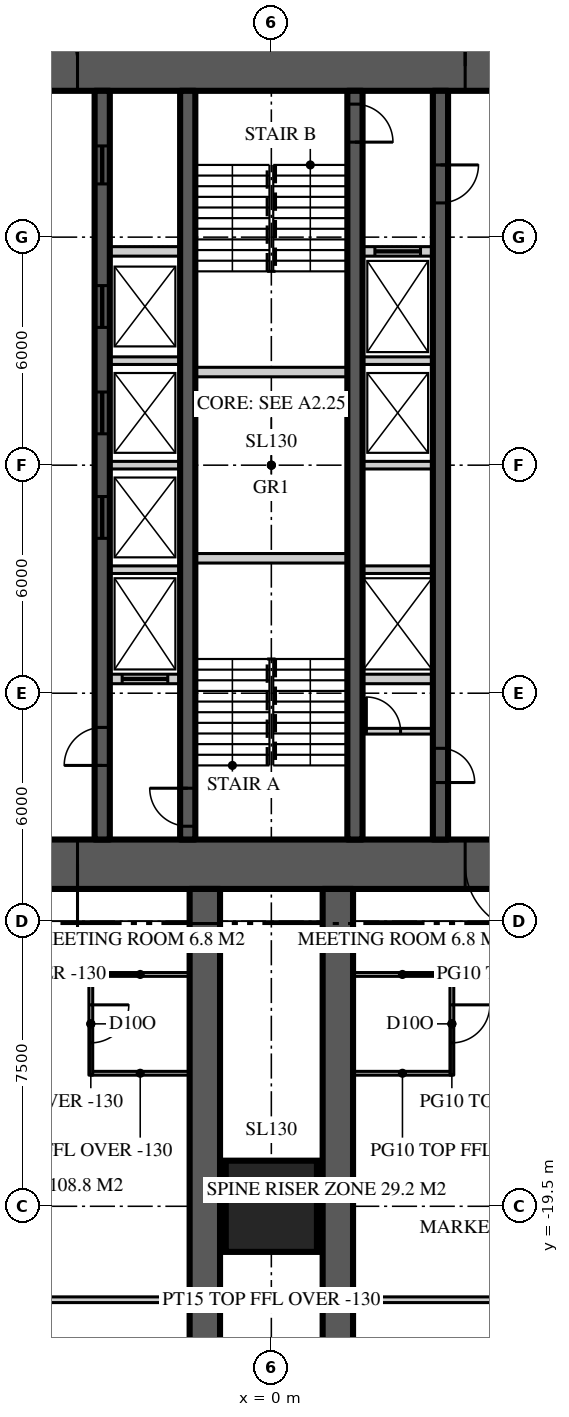
"""IFC4 building model, lengths in metres.
Left out: names, types, materials, properties, quantities, classifications, styles, units other than length and angle.
Written with IfcOpenShell. Run it as: python <this file> out.ifc"""

import sys

from ifc_helpers import new_model, si_unit, direction, frame, frame_2d, origin, origin_2d, place, context, subcontext, project, spatial, rectangle, extrude, element, fill, save


model = new_model("IFC4")
c1 = context("Model", 3, precision=1e-05, world=origin(), true_north=direction((0.0, 1.0)))
c2 = subcontext(c1, "Body", "Model", "MODEL_VIEW")
j1 = project(units=[si_unit("LENGTHUNIT", "METRE"), si_unit("PLANEANGLEUNIT", "RADIAN")], contexts=[c1])
p1 = place(None, origin())
s1 = spatial("IfcSite", under=j1, at=p1, CompositionType="ELEMENT")
p2 = place(p1, origin())
s2 = spatial("IfcBuilding", under=s1, at=p2, CompositionType="ELEMENT")
p3 = place(p2, frame((0.0, 0.0, 190.5)))
s3 = spatial("IfcBuildingStorey", under=s2, at=p3, CompositionType="ELEMENT", Elevation=190.5)
p4 = place(p3, frame((-11.15, 10.5, 0.0), z_axis=(0.0, 0.0, 1.0), x_axis=(1.0, 0.0, 0.0)))
e1 = element("IfcWall", 1, at=p4, inside=s3, PredefinedType="SHEAR", context=c2, shape_type="SweptSolid", body=[
    extrude(rectangle(XDim=22.3, YDim=1.3, at=frame_2d((11.15, 0.0))), origin(), (0.0, 0.0, 1.0), 3.9),
])
p5 = place(p4, frame((4.25, 0.0, 0.0)))
e2 = element("IfcOpeningElement", 2, at=p5, cuts=e1, PredefinedType="OPENING", context=c2, shape_type="SweptSolid", body=[
    extrude(rectangle(XDim=1.8, YDim=2.2, at=frame_2d((0.9, 1.1))), frame((0.0, 0.66, 0.0), z_axis=(0.0, -1.0, 0.0), x_axis=(1.0, 0.0, 0.0)), (0.0, 0.0, 1.0), 1.32),
])
p6 = place(p4, frame((16.25, 0.0, 0.0)))
e3 = element("IfcOpeningElement", 3, at=p6, cuts=e1, PredefinedType="OPENING", context=c2, shape_type="SweptSolid", body=[
    extrude(rectangle(XDim=1.8, YDim=2.2, at=frame_2d((0.9, 1.1))), frame((0.0, 0.66, 0.0), z_axis=(0.0, -1.0, 0.0), x_axis=(1.0, 0.0, 0.0)), (0.0, 0.0, 1.0), 1.32),
])
p7 = place(p3, frame((11.15, -10.5, 0.0), z_axis=(0.0, 0.0, 1.0), x_axis=(-1.0, 0.0, 0.0)))
e4 = element("IfcWall", 4, at=p7, inside=s3, PredefinedType="SHEAR", context=c2, shape_type="SweptSolid", body=[
    extrude(rectangle(XDim=22.3, YDim=1.3, at=frame_2d((11.15, 0.0))), origin(), (0.0, 0.0, 1.0), 3.9),
])
p8 = place(p7, frame((16.25, 0.0, 0.0)))
e5 = element("IfcOpeningElement", 5, at=p8, cuts=e4, PredefinedType="OPENING", context=c2, shape_type="SweptSolid", body=[
    extrude(rectangle(XDim=1.8, YDim=2.2, at=frame_2d((0.9, 1.1))), frame((0.0, 0.66, 0.0), z_axis=(0.0, -1.0, 0.0), x_axis=(1.0, 0.0, 0.0)), (0.0, 0.0, 1.0), 1.32),
])
p9 = place(p7, frame((4.25, 0.0, 0.0)))
e6 = element("IfcOpeningElement", 6, at=p9, cuts=e4, PredefinedType="OPENING", context=c2, shape_type="SweptSolid", body=[
    extrude(rectangle(XDim=1.8, YDim=2.2, at=frame_2d((0.9, 1.1))), frame((0.0, 0.66, 0.0), z_axis=(0.0, -1.0, 0.0), x_axis=(1.0, 0.0, 0.0)), (0.0, 0.0, 1.0), 1.32),
])
for number, where, z_axis, x_axis in (
    (7, (-1.75, -11.15, 0.0), (0.0, 0.0, 1.0), (0.0, -1.0, 0.0)),
    (8, (1.75, -11.15, 0.0), (0.0, 0.0, 1.0), (0.0, -1.0, 0.0)),
):
    element("IfcWall", number, at=place(p3, frame(where, z_axis=z_axis, x_axis=x_axis)), inside=s3, PredefinedType="SHEAR", context=c2, shape_type="SweptSolid", body=[
        extrude(rectangle(XDim=15.25, YDim=0.8, at=frame_2d((7.625, 0.0))), origin(), (0.0, 0.0, 1.0), 3.9),
    ])
p10 = place(p3, frame((0.0, -19.5, 0.0), z_axis=(0.0, 0.0, 1.0), x_axis=(1.0, 0.0, 0.0)))
e9 = element("IfcColumn", 9, at=p10, inside=s3, PredefinedType="COLUMN", context=c2, shape_type="SweptSolid", body=[
    extrude(rectangle(XDim=2.4, YDim=2.4, at=origin_2d()), origin(), (0.0, 0.0, 1.0), 3.9),
])
p11 = place(p3, frame((-4.45, -9.85, 0.0), z_axis=(0.0, 0.0, 1.0), x_axis=(0.0, 1.0, 0.0)))
e10 = element("IfcWall", 10, at=p11, inside=s3, PredefinedType="SHEAR", context=c2, shape_type="SweptSolid", body=[
    extrude(rectangle(XDim=19.7, YDim=0.4, at=frame_2d((9.85, 0.0))), origin(), (0.0, 0.0, 1.0), 3.9),
])
p12 = place(p11, frame((1.95, 0.0, 0.0)))
e11 = element("IfcOpeningElement", 11, at=p12, cuts=e10, PredefinedType="OPENING", context=c2, shape_type="SweptSolid", body=[
    extrude(rectangle(XDim=1.0, YDim=2.2, at=frame_2d((0.5, 1.1))), frame((0.0, 0.21, 0.0), z_axis=(0.0, -1.0, 0.0), x_axis=(1.0, 0.0, 0.0)), (0.0, 0.0, 1.0), 0.42),
])
p13 = place(p11, frame((17.25, 0.0, 0.0)))
e12 = element("IfcOpeningElement", 12, at=p13, cuts=e10, PredefinedType="OPENING", context=c2, shape_type="SweptSolid", body=[
    extrude(rectangle(XDim=1.0, YDim=2.1, at=frame_2d((0.5, 1.05))), frame((0.0, 0.21, 0.0), z_axis=(0.0, -1.0, 0.0), x_axis=(1.0, 0.0, 0.0)), (0.0, 0.0, 1.0), 0.42),
])
p14 = place(p11, frame((7.925, 0.0, 0.0)))
e13 = element("IfcOpeningElement", 13, at=p14, cuts=e10, PredefinedType="OPENING", context=c2, shape_type="SweptSolid", body=[
    extrude(rectangle(XDim=1.1, YDim=2.2, at=frame_2d((0.55, 1.1))), frame((0.0, 0.21, 0.0), z_axis=(0.0, -1.0, 0.0), x_axis=(1.0, 0.0, 0.0)), (0.0, 0.0, 1.0), 0.42),
])
p15 = place(p11, frame((10.675, 0.0, 0.0)))
e14 = element("IfcOpeningElement", 14, at=p15, cuts=e10, PredefinedType="OPENING", context=c2, shape_type="SweptSolid", body=[
    extrude(rectangle(XDim=1.1, YDim=2.2, at=frame_2d((0.55, 1.1))), frame((0.0, 0.21, 0.0), z_axis=(0.0, -1.0, 0.0), x_axis=(1.0, 0.0, 0.0)), (0.0, 0.0, 1.0), 0.42),
])
p16 = place(p11, frame((13.475, 0.0, 0.0)))
e15 = element("IfcOpeningElement", 15, at=p16, cuts=e10, PredefinedType="OPENING", context=c2, shape_type="SweptSolid", body=[
    extrude(rectangle(XDim=1.1, YDim=2.2, at=frame_2d((0.55, 1.1))), frame((0.0, 0.21, 0.0), z_axis=(0.0, -1.0, 0.0), x_axis=(1.0, 0.0, 0.0)), (0.0, 0.0, 1.0), 0.42),
])
p17 = place(p3, frame((4.45, 9.85, 0.0), z_axis=(0.0, 0.0, 1.0), x_axis=(0.0, -1.0, 0.0)))
e16 = element("IfcWall", 16, at=p17, inside=s3, PredefinedType="SHEAR", context=c2, shape_type="SweptSolid", body=[
    extrude(rectangle(XDim=19.7, YDim=0.4, at=frame_2d((9.85, 0.0))), origin(), (0.0, 0.0, 1.0), 3.9),
])
p18 = place(p17, frame((1.95, 0.0, 0.0)))
e17 = element("IfcOpeningElement", 17, at=p18, cuts=e16, PredefinedType="OPENING", context=c2, shape_type="SweptSolid", body=[
    extrude(rectangle(XDim=1.0, YDim=2.2, at=frame_2d((0.5, 1.1))), frame((0.0, 0.21, 0.0), z_axis=(0.0, -1.0, 0.0), x_axis=(1.0, 0.0, 0.0)), (0.0, 0.0, 1.0), 0.42),
])
p19 = place(p17, frame((17.3, 0.0, 0.0)))
e18 = element("IfcOpeningElement", 18, at=p19, cuts=e16, PredefinedType="OPENING", context=c2, shape_type="SweptSolid", body=[
    extrude(rectangle(XDim=0.9, YDim=2.1, at=frame_2d((0.45, 1.05))), frame((0.0, 0.21, 0.0), z_axis=(0.0, -1.0, 0.0), x_axis=(1.0, 0.0, 0.0)), (0.0, 0.0, 1.0), 0.42),
])
p20 = place(p3, frame((-2.2, -9.85, 0.0), z_axis=(0.0, 0.0, 1.0), x_axis=(0.0, 1.0, 0.0)))
e19 = element("IfcWall", 19, at=p20, inside=s3, PredefinedType="SHEAR", context=c2, shape_type="SweptSolid", body=[
    extrude(rectangle(XDim=19.7, YDim=0.4, at=frame_2d((9.85, 0.0))), origin(), (0.0, 0.0, 1.0), 3.9),
])
p21 = place(p20, frame((0.35, 0.0, 0.0)))
e20 = element("IfcOpeningElement", 20, at=p21, cuts=e19, PredefinedType="OPENING", context=c2, shape_type="SweptSolid", body=[
    extrude(rectangle(XDim=1.0, YDim=2.2, at=frame_2d((0.5, 1.1))), frame((0.0, 0.21, 0.0), z_axis=(0.0, -1.0, 0.0), x_axis=(1.0, 0.0, 0.0)), (0.0, 0.0, 1.0), 0.42),
])
p22 = place(p3, frame((2.2, 9.85, 0.0), z_axis=(0.0, 0.0, 1.0), x_axis=(0.0, -1.0, 0.0)))
e21 = element("IfcWall", 21, at=p22, inside=s3, PredefinedType="SHEAR", context=c2, shape_type="SweptSolid", body=[
    extrude(rectangle(XDim=19.7, YDim=0.4, at=frame_2d((9.85, 0.0))), origin(), (0.0, 0.0, 1.0), 3.9),
])
p23 = place(p22, frame((0.35, 0.0, 0.0)))
e22 = element("IfcOpeningElement", 22, at=p23, cuts=e21, PredefinedType="OPENING", context=c2, shape_type="SweptSolid", body=[
    extrude(rectangle(XDim=1.0, YDim=2.2, at=frame_2d((0.5, 1.1))), frame((0.0, 0.21, 0.0), z_axis=(0.0, -1.0, 0.0), x_axis=(1.0, 0.0, 0.0)), (0.0, 0.0, 1.0), 0.42),
])
p24 = place(p3, frame((-4.25, 5.625, 0.0), z_axis=(0.0, 0.0, 1.0), x_axis=(1.0, 0.0, 0.0)))
e23 = element("IfcWall", 23, at=p24, inside=s3, PredefinedType="SOLIDWALL", context=c2, shape_type="SweptSolid", body=[
    extrude(rectangle(XDim=1.85, YDim=0.25, at=frame_2d((0.925, 0.0))), origin(), (0.0, 0.0, 1.0), 3.7),
])
p25 = place(p3, frame((2.4, 5.625, 0.0), z_axis=(0.0, 0.0, 1.0), x_axis=(1.0, 0.0, 0.0)))
e24 = element("IfcWall", 24, at=p25, inside=s3, PredefinedType="SOLIDWALL", context=c2, shape_type="SweptSolid", body=[
    extrude(rectangle(XDim=1.85, YDim=0.25, at=frame_2d((0.925, 0.0))), origin(), (0.0, 0.0, 1.0), 3.7),
])
p26 = place(p25, frame((0.325, 0.0, 0.0)))
e25 = element("IfcOpeningElement", 25, at=p26, cuts=e24, PredefinedType="OPENING", context=c2, shape_type="SweptSolid", body=[
    extrude(rectangle(XDim=1.2, YDim=2.2, at=frame_2d((0.6, 1.1))), frame((0.0, 0.135, 0.0), z_axis=(0.0, -1.0, 0.0), x_axis=(1.0, 0.0, 0.0)), (0.0, 0.0, 1.0), 0.27),
])
p27 = place(p3, frame((-4.25, -5.625, 0.0), z_axis=(0.0, 0.0, 1.0), x_axis=(1.0, 0.0, 0.0)))
e26 = element("IfcWall", 26, at=p27, inside=s3, PredefinedType="SOLIDWALL", context=c2, shape_type="SweptSolid", body=[
    extrude(rectangle(XDim=1.85, YDim=0.25, at=frame_2d((0.925, 0.0))), origin(), (0.0, 0.0, 1.0), 3.7),
])
p28 = place(p27, frame((0.325, 0.0, 0.0)))
e27 = element("IfcOpeningElement", 27, at=p28, cuts=e26, PredefinedType="OPENING", context=c2, shape_type="SweptSolid", body=[
    extrude(rectangle(XDim=1.2, YDim=2.2, at=frame_2d((0.6, 1.1))), frame((0.0, 0.135, 0.0), z_axis=(0.0, -1.0, 0.0), x_axis=(1.0, 0.0, 0.0)), (0.0, 0.0, 1.0), 0.27),
])
p29 = place(p3, frame((2.4, -5.625, 0.0), z_axis=(0.0, 0.0, 1.0), x_axis=(1.0, 0.0, 0.0)))
e28 = element("IfcWall", 28, at=p29, inside=s3, PredefinedType="SOLIDWALL", context=c2, shape_type="SweptSolid", body=[
    extrude(rectangle(XDim=1.85, YDim=0.25, at=frame_2d((0.925, 0.0))), origin(), (0.0, 0.0, 1.0), 3.7),
])
for number, where, z_axis, x_axis in (
    (29, (-2.0, -2.45, 0.0), (0.0, 0.0, 1.0), (1.0, 0.0, 0.0)),
    (30, (-2.0, 2.45, 0.0), (0.0, 0.0, 1.0), (1.0, 0.0, 0.0)),
):
    element("IfcWall", number, at=place(p3, frame(where, z_axis=z_axis, x_axis=x_axis)), inside=s3, PredefinedType="SOLIDWALL", context=c2, shape_type="SweptSolid", body=[
        extrude(rectangle(XDim=4.0, YDim=0.25, at=frame_2d((2.0, 0.0))), origin(), (0.0, 0.0, 1.0), 3.7),
    ])
for number, where, z_axis, x_axis in (
    (31, (-4.25, -2.75, 0.0), (0.0, 0.0, 1.0), (1.0, 0.0, 0.0)),
    (32, (2.4, -2.75, 0.0), (0.0, 0.0, 1.0), (1.0, 0.0, 0.0)),
    (33, (-4.25, 0.0, 0.0), (0.0, 0.0, 1.0), (1.0, 0.0, 0.0)),
    (34, (2.4, 0.0, 0.0), (0.0, 0.0, 1.0), (1.0, 0.0, 0.0)),
    (35, (-4.25, 2.75, 0.0), (0.0, 0.0, 1.0), (1.0, 0.0, 0.0)),
    (36, (2.4, 2.75, 0.0), (0.0, 0.0, 1.0), (1.0, 0.0, 0.0)),
):
    element("IfcWall", number, at=place(p3, frame(where, z_axis=z_axis, x_axis=x_axis)), inside=s3, PredefinedType="SOLIDWALL", context=c2, shape_type="SweptSolid", body=[
        extrude(rectangle(XDim=1.85, YDim=0.2, at=frame_2d((0.925, 0.0))), origin(), (0.0, 0.0, 1.0), 3.7),
    ])
p30 = place(p3, frame((-12.786, -21.959, 0.0), z_axis=(0.0, 0.0, 1.0), x_axis=(1.0, 0.0, 0.0)))
e37 = element("IfcWall", 37, at=p30, inside=s3, PredefinedType="PARTITIONING", context=c2, shape_type="SweptSolid", body=[
    extrude(rectangle(XDim=25.573, YDim=0.15, at=frame_2d((12.786, 0.0))), origin(), (0.0, 0.0, 1.0), 3.77),
])
p31 = place(p30, frame((18.687, 0.0, 0.0)))
e38 = element("IfcOpeningElement", 38, at=p31, cuts=e37, PredefinedType="OPENING", context=c2, shape_type="SweptSolid", body=[
    extrude(rectangle(XDim=1.0, YDim=2.2, at=frame_2d((0.5, 1.1))), frame((0.0, 0.085, 0.0), z_axis=(0.0, -1.0, 0.0), x_axis=(1.0, 0.0, 0.0)), (0.0, 0.0, 1.0), 0.17),
])
p32 = place(p30, frame((5.886, 0.0, 0.0)))
e39 = element("IfcOpeningElement", 39, at=p32, cuts=e37, PredefinedType="OPENING", context=c2, shape_type="SweptSolid", body=[
    extrude(rectangle(XDim=1.0, YDim=2.2, at=frame_2d((0.5, 1.1))), frame((0.0, 0.085, 0.0), z_axis=(0.0, -1.0, 0.0), x_axis=(1.0, 0.0, 0.0)), (0.0, 0.0, 1.0), 0.17),
])
for number, where, z_axis, x_axis in (
    (40, (2.15, -13.4, 0.0), (0.0, 0.0, 1.0), (1.0, 0.0, 0.0)),
    (41, (2.15, -16.0, 0.0), (0.0, 0.0, 1.0), (1.0, 0.0, 0.0)),
):
    element("IfcWall", number, at=place(p3, frame(where, z_axis=z_axis, x_axis=x_axis)), inside=s3, PredefinedType="PARTITIONING", context=c2, shape_type="SweptSolid", body=[
        extrude(rectangle(XDim=2.6, YDim=0.1, at=frame_2d((1.3, 0.0))), origin(), (0.0, 0.0, 1.0), 3.77),
    ])
p33 = place(p3, frame((4.75, -13.35, 0.0), z_axis=(0.0, 0.0, 1.0), x_axis=(0.0, -1.0, 0.0)))
e42 = element("IfcWall", 42, at=p33, inside=s3, PredefinedType="PARTITIONING", context=c2, shape_type="SweptSolid", body=[
    extrude(rectangle(XDim=2.7, YDim=0.1, at=frame_2d((1.35, 0.0))), origin(), (0.0, 0.0, 1.0), 3.77),
])
p34 = place(p33, frame((0.85, 0.0, 0.0)))
e43 = element("IfcOpeningElement", 43, at=p34, cuts=e42, PredefinedType="OPENING", context=c2, shape_type="SweptSolid", body=[
    extrude(rectangle(XDim=1.0, YDim=2.2, at=frame_2d((0.5, 1.1))), frame((0.0, 0.06, 0.0), z_axis=(0.0, -1.0, 0.0), x_axis=(1.0, 0.0, 0.0)), (0.0, 0.0, 1.0), 0.12),
])
for number, where, z_axis, x_axis in (
    (44, (-2.15, -13.4, 0.0), (0.0, 0.0, 1.0), (-1.0, 0.0, 0.0)),
    (45, (-2.15, -16.0, 0.0), (0.0, 0.0, 1.0), (-1.0, 0.0, 0.0)),
):
    element("IfcWall", number, at=place(p3, frame(where, z_axis=z_axis, x_axis=x_axis)), inside=s3, PredefinedType="PARTITIONING", context=c2, shape_type="SweptSolid", body=[
        extrude(rectangle(XDim=2.6, YDim=0.1, at=frame_2d((1.3, 0.0))), origin(), (0.0, 0.0, 1.0), 3.77),
    ])
p35 = place(p3, frame((-4.75, -13.35, 0.0), z_axis=(0.0, 0.0, 1.0), x_axis=(0.0, -1.0, 0.0)))
e46 = element("IfcWall", 46, at=p35, inside=s3, PredefinedType="PARTITIONING", context=c2, shape_type="SweptSolid", body=[
    extrude(rectangle(XDim=2.7, YDim=0.1, at=frame_2d((1.35, 0.0))), origin(), (0.0, 0.0, 1.0), 3.77),
])
p36 = place(p35, frame((0.85, 0.0, 0.0)))
e47 = element("IfcOpeningElement", 47, at=p36, cuts=e46, PredefinedType="OPENING", context=c2, shape_type="SweptSolid", body=[
    extrude(rectangle(XDim=1.0, YDim=2.2, at=frame_2d((0.5, 1.1))), frame((0.0, 0.06, 0.0), z_axis=(0.0, -1.0, 0.0), x_axis=(1.0, 0.0, 0.0)), (0.0, 0.0, 1.0), 0.12),
])
p37 = place(p3, frame((2.4, -7.0, 0.0), z_axis=(0.0, 0.0, 1.0), x_axis=(1.0, 0.0, 0.0)))
e48 = element("IfcWall", 48, at=p37, inside=s3, PredefinedType="SOLIDWALL", context=c2, shape_type="SweptSolid", body=[
    extrude(rectangle(XDim=1.85, YDim=0.15, at=frame_2d((0.925, 0.0))), origin(), (0.0, 0.0, 1.0), 3.77),
])
p38 = place(p37, frame((0.1, 0.0, 0.0)))
e49 = element("IfcOpeningElement", 49, at=p38, cuts=e48, PredefinedType="OPENING", context=c2, shape_type="SweptSolid", body=[
    extrude(rectangle(XDim=0.9, YDim=2.1, at=frame_2d((0.45, 1.05))), frame((0.0, 0.085, 0.0), z_axis=(0.0, -1.0, 0.0), x_axis=(1.0, 0.0, 0.0)), (0.0, 0.0, 1.0), 0.17),
])
p39 = place(p5, origin())
e50 = element("IfcDoor", 50, at=p39, inside=s3, OperationType="DOUBLE_DOOR_DOUBLE_SWING", PredefinedType="DOOR", context=c2, shape_type="SweptSolid", body=[
    extrude(rectangle(XDim=1.8, YDim=2.2, at=frame_2d((0.9, 1.1))), frame((0.0, 0.025, 0.0), z_axis=(0.0, -1.0, 0.0), x_axis=(1.0, 0.0, 0.0)), (0.0, 0.0, 1.0), 0.05),
])
fill(e2, e50)
p40 = place(p8, origin())
e51 = element("IfcDoor", 51, at=p40, inside=s3, OperationType="DOUBLE_DOOR_DOUBLE_SWING", PredefinedType="DOOR", context=c2, shape_type="SweptSolid", body=[
    extrude(rectangle(XDim=1.8, YDim=2.2, at=frame_2d((0.9, 1.1))), frame((0.0, 0.025, 0.0), z_axis=(0.0, -1.0, 0.0), x_axis=(1.0, 0.0, 0.0)), (0.0, 0.0, 1.0), 0.05),
])
fill(e5, e51)
p41 = place(p6, origin())
e52 = element("IfcDoor", 52, at=p41, inside=s3, OperationType="DOUBLE_DOOR_DOUBLE_SWING", PredefinedType="DOOR", context=c2, shape_type="SweptSolid", body=[
    extrude(rectangle(XDim=1.8, YDim=2.2, at=frame_2d((0.9, 1.1))), frame((0.0, 0.025, 0.0), z_axis=(0.0, -1.0, 0.0), x_axis=(1.0, 0.0, 0.0)), (0.0, 0.0, 1.0), 0.05),
])
fill(e3, e52)
p42 = place(p9, origin())
e53 = element("IfcDoor", 53, at=p42, inside=s3, OperationType="DOUBLE_DOOR_DOUBLE_SWING", PredefinedType="DOOR", context=c2, shape_type="SweptSolid", body=[
    extrude(rectangle(XDim=1.8, YDim=2.2, at=frame_2d((0.9, 1.1))), frame((0.0, 0.025, 0.0), z_axis=(0.0, -1.0, 0.0), x_axis=(1.0, 0.0, 0.0)), (0.0, 0.0, 1.0), 0.05),
])
fill(e6, e53)
p43 = place(p12, origin())
e54 = element("IfcDoor", 54, at=p43, inside=s3, OperationType="SINGLE_SWING_LEFT", PredefinedType="DOOR", context=c2, shape_type="SweptSolid", body=[
    extrude(rectangle(XDim=1.0, YDim=2.2, at=frame_2d((0.5, 1.1))), frame((0.0, 0.025, 0.0), z_axis=(0.0, -1.0, 0.0), x_axis=(1.0, 0.0, 0.0)), (0.0, 0.0, 1.0), 0.05),
])
fill(e11, e54)
p44 = place(p21, origin())
e55 = element("IfcDoor", 55, at=p44, inside=s3, OperationType="SINGLE_SWING_RIGHT", PredefinedType="DOOR", context=c2, shape_type="SweptSolid", body=[
    extrude(rectangle(XDim=1.0, YDim=2.2, at=frame_2d((0.5, 1.1))), frame((0.0, 0.025, 0.0), z_axis=(0.0, -1.0, 0.0), x_axis=(1.0, 0.0, 0.0)), (0.0, 0.0, 1.0), 0.05),
])
fill(e20, e55)
p45 = place(p18, origin())
e56 = element("IfcDoor", 56, at=p45, inside=s3, OperationType="SINGLE_SWING_LEFT", PredefinedType="DOOR", context=c2, shape_type="SweptSolid", body=[
    extrude(rectangle(XDim=1.0, YDim=2.2, at=frame_2d((0.5, 1.1))), frame((0.0, 0.025, 0.0), z_axis=(0.0, -1.0, 0.0), x_axis=(1.0, 0.0, 0.0)), (0.0, 0.0, 1.0), 0.05),
])
fill(e17, e56)
p46 = place(p23, origin())
e57 = element("IfcDoor", 57, at=p46, inside=s3, OperationType="SINGLE_SWING_RIGHT", PredefinedType="DOOR", context=c2, shape_type="SweptSolid", body=[
    extrude(rectangle(XDim=1.0, YDim=2.2, at=frame_2d((0.5, 1.1))), frame((0.0, 0.025, 0.0), z_axis=(0.0, -1.0, 0.0), x_axis=(1.0, 0.0, 0.0)), (0.0, 0.0, 1.0), 0.05),
])
fill(e22, e57)
p47 = place(p13, origin())
e58 = element("IfcDoor", 58, at=p47, inside=s3, OperationType="SLIDING_TO_LEFT", PredefinedType="DOOR", context=c2, shape_type="SweptSolid", body=[
    extrude(rectangle(XDim=1.0, YDim=2.1, at=frame_2d((0.5, 1.05))), frame((0.0, 0.025, 0.0), z_axis=(0.0, -1.0, 0.0), x_axis=(1.0, 0.0, 0.0)), (0.0, 0.0, 1.0), 0.05),
])
fill(e12, e58)
p48 = place(p19, origin())
e59 = element("IfcDoor", 59, at=p48, inside=s3, OperationType="SINGLE_SWING_RIGHT", PredefinedType="DOOR", context=c2, shape_type="SweptSolid", body=[
    extrude(rectangle(XDim=0.9, YDim=2.1, at=frame_2d((0.45, 1.05))), frame((0.0, 0.025, 0.0), z_axis=(0.0, -1.0, 0.0), x_axis=(1.0, 0.0, 0.0)), (0.0, 0.0, 1.0), 0.05),
])
fill(e18, e59)
p49 = place(p14, origin())
e60 = element("IfcDoor", 60, at=p49, inside=s3, OperationType="SLIDING_TO_LEFT", PredefinedType="DOOR", context=c2, shape_type="SweptSolid", body=[
    extrude(rectangle(XDim=1.1, YDim=2.2, at=frame_2d((0.55, 1.1))), frame((0.0, 0.025, 0.0), z_axis=(0.0, -1.0, 0.0), x_axis=(1.0, 0.0, 0.0)), (0.0, 0.0, 1.0), 0.05),
])
fill(e13, e60)
p50 = place(p15, origin())
e61 = element("IfcDoor", 61, at=p50, inside=s3, OperationType="SLIDING_TO_LEFT", PredefinedType="DOOR", context=c2, shape_type="SweptSolid", body=[
    extrude(rectangle(XDim=1.1, YDim=2.2, at=frame_2d((0.55, 1.1))), frame((0.0, 0.025, 0.0), z_axis=(0.0, -1.0, 0.0), x_axis=(1.0, 0.0, 0.0)), (0.0, 0.0, 1.0), 0.05),
])
fill(e14, e61)
p51 = place(p16, origin())
e62 = element("IfcDoor", 62, at=p51, inside=s3, OperationType="SLIDING_TO_LEFT", PredefinedType="DOOR", context=c2, shape_type="SweptSolid", body=[
    extrude(rectangle(XDim=1.1, YDim=2.2, at=frame_2d((0.55, 1.1))), frame((0.0, 0.025, 0.0), z_axis=(0.0, -1.0, 0.0), x_axis=(1.0, 0.0, 0.0)), (0.0, 0.0, 1.0), 0.05),
])
fill(e15, e62)
p52 = place(p28, origin())
e63 = element("IfcDoor", 63, at=p52, inside=s3, OperationType="SLIDING_TO_LEFT", PredefinedType="DOOR", context=c2, shape_type="SweptSolid", body=[
    extrude(rectangle(XDim=1.2, YDim=2.2, at=frame_2d((0.6, 1.1))), frame((0.0, 0.025, 0.0), z_axis=(0.0, -1.0, 0.0), x_axis=(1.0, 0.0, 0.0)), (0.0, 0.0, 1.0), 0.05),
])
fill(e27, e63)
p53 = place(p26, origin())
e64 = element("IfcDoor", 64, at=p53, inside=s3, OperationType="SLIDING_TO_LEFT", PredefinedType="DOOR", context=c2, shape_type="SweptSolid", body=[
    extrude(rectangle(XDim=1.2, YDim=2.2, at=frame_2d((0.6, 1.1))), frame((0.0, 0.025, 0.0), z_axis=(0.0, -1.0, 0.0), x_axis=(1.0, 0.0, 0.0)), (0.0, 0.0, 1.0), 0.05),
])
fill(e25, e64)
p54 = place(p34, origin())
e65 = element("IfcDoor", 65, at=p54, inside=s3, OperationType="SINGLE_SWING_LEFT", PredefinedType="DOOR", context=c2, shape_type="SweptSolid", body=[
    extrude(rectangle(XDim=1.0, YDim=2.2, at=frame_2d((0.5, 1.1))), frame((0.0, 0.025, 0.0), z_axis=(0.0, -1.0, 0.0), x_axis=(1.0, 0.0, 0.0)), (0.0, 0.0, 1.0), 0.05),
])
fill(e43, e65)
p55 = place(p36, origin())
e66 = element("IfcDoor", 66, at=p55, inside=s3, OperationType="SINGLE_SWING_LEFT", PredefinedType="DOOR", context=c2, shape_type="SweptSolid", body=[
    extrude(rectangle(XDim=1.0, YDim=2.2, at=frame_2d((0.5, 1.1))), frame((0.0, 0.025, 0.0), z_axis=(0.0, -1.0, 0.0), x_axis=(1.0, 0.0, 0.0)), (0.0, 0.0, 1.0), 0.05),
])
fill(e47, e66)
p56 = place(p38, origin())
e67 = element("IfcDoor", 67, at=p56, inside=s3, OperationType="SINGLE_SWING_LEFT", PredefinedType="DOOR", context=c2, shape_type="SweptSolid", body=[
    extrude(rectangle(XDim=0.9, YDim=2.1, at=frame_2d((0.45, 1.05))), frame((0.0, 0.025, 0.0), z_axis=(0.0, -1.0, 0.0), x_axis=(1.0, 0.0, 0.0)), (0.0, 0.0, 1.0), 0.05),
])
fill(e49, e67)
save(model, sys.argv[1])
